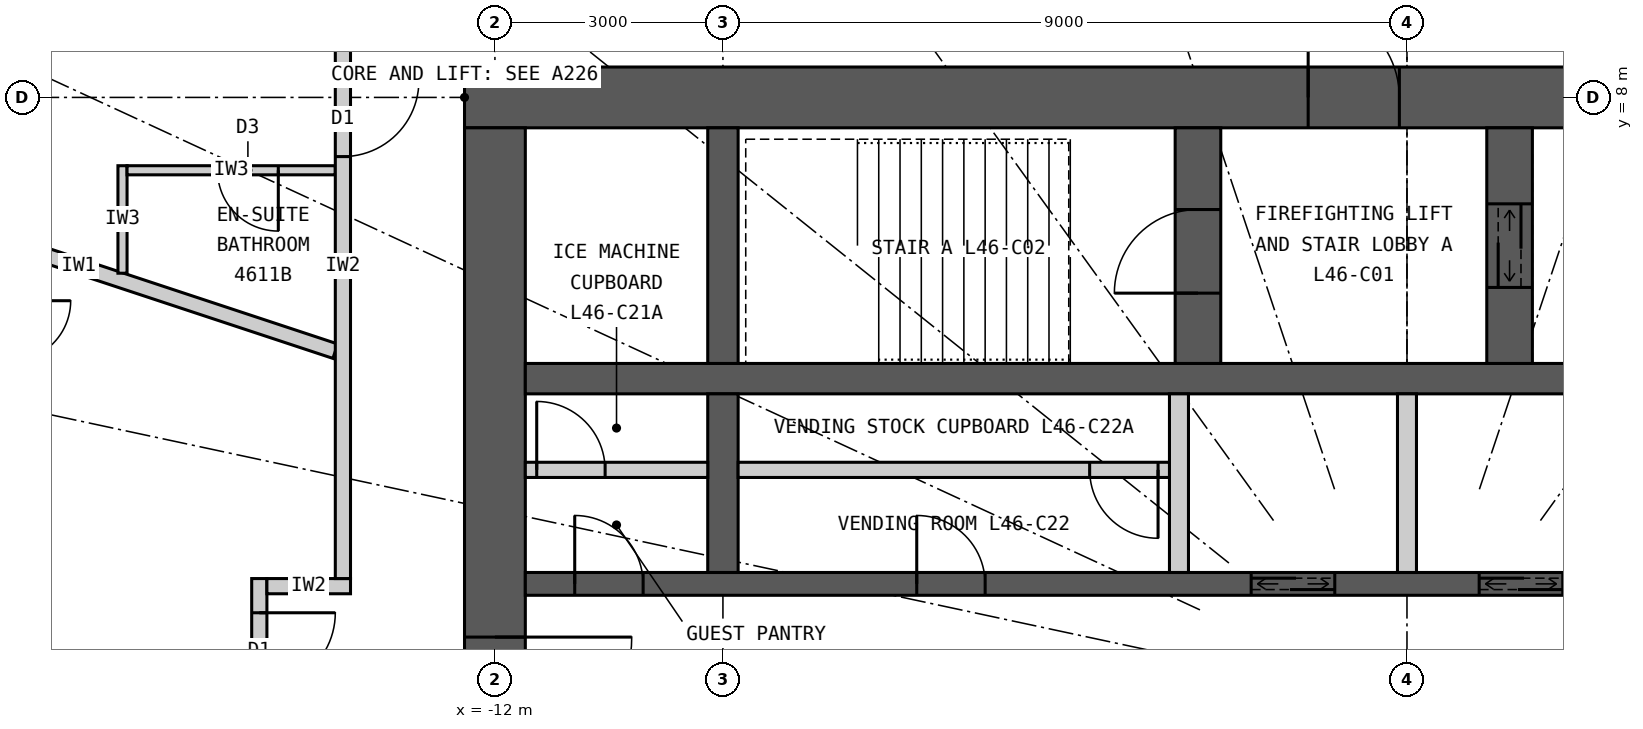
"""IFC4 building model, lengths in metres.
Left out: names, types, materials, properties, quantities, classifications, styles, units other than length and angle.
Written with IfcOpenShell. Run it as: python <this file> out.ifc"""

import sys

from ifc_helpers import new_model, si_unit, direction, frame, frame_2d, origin, place, context, subcontext, project, spatial, rectangle, extrude, element, fill, save


model = new_model("IFC4")
c1 = context("Model", 3, precision=1e-05, world=origin(), true_north=direction((0.0, 1.0)))
c2 = subcontext(c1, "Body", "Model", "MODEL_VIEW")
j1 = project(units=[si_unit("LENGTHUNIT", "METRE"), si_unit("PLANEANGLEUNIT", "RADIAN")], contexts=[c1])
p1 = place(None, origin())
s1 = spatial("IfcSite", under=j1, at=p1, CompositionType="ELEMENT")
p2 = place(p1, origin())
s2 = spatial("IfcBuilding", under=s1, at=p2, CompositionType="ELEMENT")
p3 = place(p2, frame((0.0, 0.0, 173.1)))
s3 = spatial("IfcBuildingStorey", under=s2, at=p3, CompositionType="ELEMENT", Elevation=173.1)
p4 = place(p3, frame((-12.4, 8.0, 0.0), z_axis=(0.0, 0.0, 1.0), x_axis=(1.0, 0.0, 0.0)))
e1 = element("IfcWall", 1, at=p4, inside=s3, PredefinedType="SHEAR", context=c2, shape_type="SweptSolid", body=[
    extrude(rectangle(XDim=24.8, YDim=0.8, at=frame_2d((12.4, 0.0))), origin(), (0.0, 0.0, 1.0), 3.3),
])
p5 = place(p4, frame((11.1, 0.0, 0.0)))
e2 = element("IfcOpeningElement", 2, at=p5, cuts=e1, PredefinedType="OPENING", context=c2, shape_type="SweptSolid", body=[
    extrude(rectangle(XDim=1.2, YDim=2.2, at=frame_2d((0.6, 1.1))), frame((0.0, 0.41, 0.0), z_axis=(0.0, -1.0, 0.0), x_axis=(1.0, 0.0, 0.0)), (0.0, 0.0, 1.0), 0.82),
])
p6 = place(p4, frame((18.7, 0.0, 0.0)))
e3 = element("IfcOpeningElement", 3, at=p6, cuts=e1, PredefinedType="OPENING", context=c2, shape_type="SweptSolid", body=[
    extrude(rectangle(XDim=0.9, YDim=2.2, at=frame_2d((0.45, 1.1))), frame((0.0, 0.41, 0.0), z_axis=(0.0, -1.0, 0.0), x_axis=(1.0, 0.0, 0.0)), (0.0, 0.0, 1.0), 0.82),
])
p7 = place(p3, frame((-12.0, 7.6, 0.0), z_axis=(0.0, 0.0, 1.0), x_axis=(0.0, -1.0, 0.0)))
e4 = element("IfcWall", 4, at=p7, inside=s3, PredefinedType="SHEAR", context=c2, shape_type="SweptSolid", body=[
    extrude(rectangle(XDim=15.2, YDim=0.8, at=frame_2d((7.6, 0.0))), origin(), (0.0, 0.0, 1.0), 3.3),
])
p8 = place(p7, frame((6.7, 0.0, 0.0)))
e5 = element("IfcOpeningElement", 5, at=p8, cuts=e4, PredefinedType="OPENING", context=c2, shape_type="SweptSolid", body=[
    extrude(rectangle(XDim=1.8, YDim=2.2, at=frame_2d((0.9, 1.1))), frame((0.0, 0.41, 0.0), z_axis=(0.0, -1.0, 0.0), x_axis=(1.0, 0.0, 0.0)), (0.0, 0.0, 1.0), 0.82),
])
p9 = place(p3, frame((-11.6, 4.3, 0.0), z_axis=(0.0, 0.0, 1.0), x_axis=(1.0, 0.0, 0.0)))
e6 = element("IfcWall", 6, at=p9, inside=s3, PredefinedType="SHEAR", context=c2, shape_type="SweptSolid", body=[
    extrude(rectangle(XDim=23.2, YDim=0.4, at=frame_2d((11.6, 0.0))), origin(), (0.0, 0.0, 1.0), 3.3),
])
p10 = place(p3, frame((-11.6, 1.6, 0.0), z_axis=(0.0, 0.0, 1.0), x_axis=(1.0, 0.0, 0.0)))
e7 = element("IfcWall", 7, at=p10, inside=s3, PredefinedType="SHEAR", context=c2, shape_type="SweptSolid", body=[
    extrude(rectangle(XDim=23.2, YDim=0.3, at=frame_2d((11.6, 0.0))), origin(), (0.0, 0.0, 1.0), 3.3),
])
p11 = place(p10, frame((9.55, 0.0, 0.0)))
e8 = element("IfcOpeningElement", 8, at=p11, cuts=e7, PredefinedType="OPENING", context=c2, shape_type="SweptSolid", body=[
    extrude(rectangle(XDim=1.1, YDim=2.2, at=frame_2d((0.55, 1.1))), frame((0.0, 0.16, 0.0), z_axis=(0.0, -1.0, 0.0), x_axis=(1.0, 0.0, 0.0)), (0.0, 0.0, 1.0), 0.32),
])
p12 = place(p10, frame((12.55, 0.0, 0.0)))
e9 = element("IfcOpeningElement", 9, at=p12, cuts=e7, PredefinedType="OPENING", context=c2, shape_type="SweptSolid", body=[
    extrude(rectangle(XDim=1.1, YDim=2.2, at=frame_2d((0.55, 1.1))), frame((0.0, 0.16, 0.0), z_axis=(0.0, -1.0, 0.0), x_axis=(1.0, 0.0, 0.0)), (0.0, 0.0, 1.0), 0.32),
])
p13 = place(p10, frame((0.65, 0.0, 0.0)))
e10 = element("IfcOpeningElement", 10, at=p13, cuts=e7, PredefinedType="OPENING", context=c2, shape_type="SweptSolid", body=[
    extrude(rectangle(XDim=0.9, YDim=2.2, at=frame_2d((0.45, 1.1))), frame((0.0, 0.16, 0.0), z_axis=(0.0, -1.0, 0.0), x_axis=(1.0, 0.0, 0.0)), (0.0, 0.0, 1.0), 0.32),
])
p14 = place(p10, frame((5.15, 0.0, 0.0)))
e11 = element("IfcOpeningElement", 11, at=p14, cuts=e7, PredefinedType="OPENING", context=c2, shape_type="SweptSolid", body=[
    extrude(rectangle(XDim=0.9, YDim=2.2, at=frame_2d((0.45, 1.1))), frame((0.0, 0.16, 0.0), z_axis=(0.0, -1.0, 0.0), x_axis=(1.0, 0.0, 0.0)), (0.0, 0.0, 1.0), 0.32),
])
p15 = place(p10, frame((21.65, 0.0, 0.0)))
e12 = element("IfcOpeningElement", 12, at=p15, cuts=e7, PredefinedType="OPENING", context=c2, shape_type="SweptSolid", body=[
    extrude(rectangle(XDim=0.9, YDim=2.2, at=frame_2d((0.45, 1.1))), frame((0.0, 0.16, 0.0), z_axis=(0.0, -1.0, 0.0), x_axis=(1.0, 0.0, 0.0)), (0.0, 0.0, 1.0), 0.32),
])
p16 = place(p3, frame((-9.0, 4.5, 0.0), z_axis=(0.0, 0.0, 1.0), x_axis=(0.0, 1.0, 0.0)))
e13 = element("IfcWall", 13, at=p16, inside=s3, PredefinedType="SHEAR", context=c2, shape_type="SweptSolid", body=[
    extrude(rectangle(XDim=3.1, YDim=0.4, at=frame_2d((1.55, 0.0))), origin(), (0.0, 0.0, 1.0), 3.3),
])
p17 = place(p3, frame((-9.0, 1.75, 0.0), z_axis=(0.0, 0.0, 1.0), x_axis=(0.0, 1.0, 0.0)))
e14 = element("IfcWall", 14, at=p17, inside=s3, PredefinedType="SHEAR", context=c2, shape_type="SweptSolid", body=[
    extrude(rectangle(XDim=2.35, YDim=0.4, at=frame_2d((1.175, 0.0))), origin(), (0.0, 0.0, 1.0), 3.3),
])
p18 = place(p3, frame((-2.75, 4.5, 0.0), z_axis=(0.0, 0.0, 1.0), x_axis=(0.0, 1.0, 0.0)))
e15 = element("IfcWall", 15, at=p18, inside=s3, PredefinedType="SHEAR", context=c2, shape_type="SweptSolid", body=[
    extrude(rectangle(XDim=3.1, YDim=0.6, at=frame_2d((1.55, 0.0))), origin(), (0.0, 0.0, 1.0), 3.3),
])
p19 = place(p18, frame((0.925, 0.0, 0.0)))
e16 = element("IfcOpeningElement", 16, at=p19, cuts=e15, PredefinedType="OPENING", context=c2, shape_type="SweptSolid", body=[
    extrude(rectangle(XDim=1.1, YDim=2.2, at=frame_2d((0.55, 1.1))), frame((0.0, 0.31, 0.0), z_axis=(0.0, -1.0, 0.0), x_axis=(1.0, 0.0, 0.0)), (0.0, 0.0, 1.0), 0.62),
])
p20 = place(p3, frame((1.35, 4.5, 0.0), z_axis=(0.0, 0.0, 1.0), x_axis=(0.0, 1.0, 0.0)))
e17 = element("IfcWall", 17, at=p20, inside=s3, PredefinedType="SHEAR", context=c2, shape_type="SweptSolid", body=[
    extrude(rectangle(XDim=3.1, YDim=0.6, at=frame_2d((1.55, 0.0))), origin(), (0.0, 0.0, 1.0), 3.3),
])
p21 = place(p20, frame((1.0, 0.0, 0.0)))
e18 = element("IfcOpeningElement", 18, at=p21, cuts=e17, PredefinedType="OPENING", context=c2, shape_type="SweptSolid", body=[
    extrude(rectangle(XDim=1.1, YDim=2.2, at=frame_2d((0.55, 1.1))), frame((0.0, 0.31, 0.0), z_axis=(0.0, -1.0, 0.0), x_axis=(1.0, 0.0, 0.0)), (0.0, 0.0, 1.0), 0.62),
])
for number, where, z_axis, x_axis in (
    (19, (-3.0, 1.75, 0.0), (0.0, 0.0, 1.0), (0.0, 1.0, 0.0)),
    (20, (0.0, 1.75, 0.0), (0.0, 0.0, 1.0), (0.0, 1.0, 0.0)),
):
    element("IfcWall", number, at=place(p3, frame(where, z_axis=z_axis, x_axis=x_axis)), inside=s3, PredefinedType="PARTITIONING", context=c2, shape_type="SweptSolid", body=[
        extrude(rectangle(XDim=2.35, YDim=0.25, at=frame_2d((1.175, 0.0))), origin(), (0.0, 0.0, 1.0), 3.3),
    ])
p22 = place(p3, frame((-14.1, 4.661, 0.0), z_axis=(0.0, 0.0, 1.0), x_axis=(-0.949453216399, 0.313908569285, 0.0)))
e21 = element("IfcWall", 21, at=p22, inside=s3, PredefinedType="PARTITIONING", context=c2, shape_type="SweptSolid", body=[
    extrude(rectangle(XDim=7.109, YDim=0.2, at=frame_2d((3.554, 0.0))), origin(), (0.0, 0.0, 1.0), 3.12),
])
p23 = place(p3, frame((-15.1, 1.67, 0.0), z_axis=(0.0, 0.0, 1.0), x_axis=(0.0, -1.0, 0.0)))
e22 = element("IfcWall", 22, at=p23, inside=s3, PredefinedType="PARTITIONING", context=c2, shape_type="SweptSolid", body=[
    extrude(rectangle(XDim=3.34, YDim=0.2, at=frame_2d((1.67, 0.0))), origin(), (0.0, 0.0, 1.0), 3.12),
])
p24 = place(p23, frame((0.45, 0.0, 0.0)))
e23 = element("IfcOpeningElement", 23, at=p24, cuts=e22, PredefinedType="OPENING", context=c2, shape_type="SweptSolid", body=[
    extrude(rectangle(XDim=1.0, YDim=2.2, at=frame_2d((0.5, 1.1))), frame((0.0, 0.11, 0.0), z_axis=(0.0, -1.0, 0.0), x_axis=(1.0, 0.0, 0.0)), (0.0, 0.0, 1.0), 0.22),
])
p25 = place(p23, frame((1.89, 0.0, 0.0)))
e24 = element("IfcOpeningElement", 24, at=p25, cuts=e22, PredefinedType="OPENING", context=c2, shape_type="SweptSolid", body=[
    extrude(rectangle(XDim=1.0, YDim=2.2, at=frame_2d((0.5, 1.1))), frame((0.0, 0.11, 0.0), z_axis=(0.0, -1.0, 0.0), x_axis=(1.0, 0.0, 0.0)), (0.0, 0.0, 1.0), 0.22),
])
p26 = place(p3, frame((-13.9, 1.57, 0.0), z_axis=(0.0, 0.0, 1.0), x_axis=(-1.0, 0.0, 0.0)))
e25 = element("IfcWall", 25, at=p26, inside=s3, PredefinedType="PARTITIONING", context=c2, shape_type="SweptSolid", body=[
    extrude(rectangle(XDim=1.1, YDim=0.2, at=frame_2d((0.55, 0.0))), origin(), (0.0, 0.0, 1.0), 2.47),
])
p27 = place(p3, frame((-16.9, 5.687, 0.0), z_axis=(0.0, 0.0, 1.0), x_axis=(0.0, 1.0, 0.0)))
e26 = element("IfcWall", 26, at=p27, inside=s3, PredefinedType="PARTITIONING", context=c2, shape_type="SweptSolid", body=[
    extrude(rectangle(XDim=1.414, YDim=0.12, at=frame_2d((0.707, 0.0))), origin(), (0.0, 0.0, 1.0), 3.12),
])
p28 = place(p3, frame((-14.1, 7.042, 0.0), z_axis=(0.0, 0.0, 1.0), x_axis=(-1.0, 0.0, 0.0)))
e27 = element("IfcWall", 27, at=p28, inside=s3, PredefinedType="PARTITIONING", context=c2, shape_type="SweptSolid", body=[
    extrude(rectangle(XDim=2.74, YDim=0.12, at=frame_2d((1.37, 0.0))), origin(), (0.0, 0.0, 1.0), 3.12),
])
p29 = place(p28, frame((0.75, 0.0, 0.0)))
e28 = element("IfcOpeningElement", 28, at=p29, cuts=e27, PredefinedType="OPENING", context=c2, shape_type="SweptSolid", body=[
    extrude(rectangle(XDim=0.8, YDim=2.1, at=frame_2d((0.4, 1.05))), frame((0.0, 0.07, 0.0), z_axis=(0.0, -1.0, 0.0), x_axis=(1.0, 0.0, 0.0)), (0.0, 0.0, 1.0), 0.14),
])
p30 = place(p3, frame((-14.0, 9.9, 0.0), z_axis=(0.0, 0.0, 1.0), x_axis=(0.0, -1.0, 0.0)))
e29 = element("IfcWall", 29, at=p30, inside=s3, PredefinedType="PARTITIONING", context=c2, shape_type="SweptSolid", body=[
    extrude(rectangle(XDim=8.23, YDim=0.2, at=frame_2d((4.115, 0.0))), origin(), (0.0, 0.0, 1.0), 3.12),
])
p31 = place(p30, frame((1.678, 0.0, 0.0)))
e30 = element("IfcOpeningElement", 30, at=p31, cuts=e29, PredefinedType="OPENING", context=c2, shape_type="SweptSolid", body=[
    extrude(rectangle(XDim=1.0, YDim=2.2, at=frame_2d((0.5, 1.1))), frame((0.0, 0.11, 0.0), z_axis=(0.0, -1.0, 0.0), x_axis=(1.0, 0.0, 0.0)), (0.0, 0.0, 1.0), 0.22),
])
p32 = place(p3, frame((-11.6, 3.1, 0.0), z_axis=(0.0, 0.0, 1.0), x_axis=(1.0, 0.0, 0.0)))
e31 = element("IfcWall", 31, at=p32, inside=s3, PredefinedType="PARTITIONING", context=c2, shape_type="SweptSolid", body=[
    extrude(rectangle(XDim=2.4, YDim=0.2, at=frame_2d((1.2, 0.0))), origin(), (0.0, 0.0, 1.0), 3.12),
])
p33 = place(p32, frame((0.15, 0.0, 0.0)))
e32 = element("IfcOpeningElement", 32, at=p33, cuts=e31, PredefinedType="OPENING", context=c2, shape_type="SweptSolid", body=[
    extrude(rectangle(XDim=0.9, YDim=2.2, at=frame_2d((0.45, 1.1))), frame((0.0, 0.11, 0.0), z_axis=(0.0, -1.0, 0.0), x_axis=(1.0, 0.0, 0.0)), (0.0, 0.0, 1.0), 0.22),
])
p34 = place(p3, frame((-8.8, 3.1, 0.0), z_axis=(0.0, 0.0, 1.0), x_axis=(1.0, 0.0, 0.0)))
e33 = element("IfcWall", 33, at=p34, inside=s3, PredefinedType="PARTITIONING", context=c2, shape_type="SweptSolid", body=[
    extrude(rectangle(XDim=5.675, YDim=0.2, at=frame_2d((2.837, 0.0))), origin(), (0.0, 0.0, 1.0), 3.12),
])
p35 = place(p34, frame((4.625, 0.0, 0.0)))
e34 = element("IfcOpeningElement", 34, at=p35, cuts=e33, PredefinedType="OPENING", context=c2, shape_type="SweptSolid", body=[
    extrude(rectangle(XDim=0.9, YDim=2.2, at=frame_2d((0.45, 1.1))), frame((0.0, 0.11, 0.0), z_axis=(0.0, -1.0, 0.0), x_axis=(1.0, 0.0, 0.0)), (0.0, 0.0, 1.0), 0.22),
])
p36 = place(p29, origin())
e35 = element("IfcDoor", 35, at=p36, inside=s3, OperationType="SINGLE_SWING_LEFT", PredefinedType="DOOR", context=c2, shape_type="SweptSolid", body=[
    extrude(rectangle(XDim=0.8, YDim=2.1, at=frame_2d((0.4, 1.05))), frame((0.0, 0.025, 0.0), z_axis=(0.0, -1.0, 0.0), x_axis=(1.0, 0.0, 0.0)), (0.0, 0.0, 1.0), 0.05),
])
fill(e28, e35)
p37 = place(p31, origin())
e36 = element("IfcDoor", 36, at=p37, inside=s3, OperationType="SINGLE_SWING_LEFT", PredefinedType="DOOR", context=c2, shape_type="SweptSolid", body=[
    extrude(rectangle(XDim=1.0, YDim=2.2, at=frame_2d((0.5, 1.1))), frame((0.0, 0.025, 0.0), z_axis=(0.0, -1.0, 0.0), x_axis=(1.0, 0.0, 0.0)), (0.0, 0.0, 1.0), 0.05),
])
fill(e30, e36)
p38 = place(p24, origin())
e37 = element("IfcDoor", 37, at=p38, inside=s3, OperationType="SINGLE_SWING_LEFT", PredefinedType="DOOR", context=c2, shape_type="SweptSolid", body=[
    extrude(rectangle(XDim=1.0, YDim=2.2, at=frame_2d((0.5, 1.1))), frame((0.0, 0.025, 0.0), z_axis=(0.0, -1.0, 0.0), x_axis=(1.0, 0.0, 0.0)), (0.0, 0.0, 1.0), 0.05),
])
fill(e23, e37)
p39 = place(p5, origin())
e38 = element("IfcDoor", 38, at=p39, inside=s3, OperationType="SINGLE_SWING_LEFT", PredefinedType="DOOR", context=c2, shape_type="SweptSolid", body=[
    extrude(rectangle(XDim=1.2, YDim=2.2, at=frame_2d((0.6, 1.1))), frame((0.0, 0.025, 0.0), z_axis=(0.0, -1.0, 0.0), x_axis=(1.0, 0.0, 0.0)), (0.0, 0.0, 1.0), 0.05),
])
fill(e2, e38)
p40 = place(p19, origin())
e39 = element("IfcDoor", 39, at=p40, inside=s3, OperationType="SINGLE_SWING_LEFT", PredefinedType="DOOR", context=c2, shape_type="SweptSolid", body=[
    extrude(rectangle(XDim=1.1, YDim=2.2, at=frame_2d((0.55, 1.1))), frame((0.0, 0.025, 0.0), z_axis=(0.0, -1.0, 0.0), x_axis=(1.0, 0.0, 0.0)), (0.0, 0.0, 1.0), 0.05),
])
fill(e16, e39)
p41 = place(p21, origin())
e40 = element("IfcDoor", 40, at=p41, inside=s3, OperationType="DOUBLE_DOOR_SLIDING", PredefinedType="DOOR", context=c2, shape_type="SweptSolid", body=[
    extrude(rectangle(XDim=1.1, YDim=2.2, at=frame_2d((0.55, 1.1))), frame((0.0, 0.025, 0.0), z_axis=(0.0, -1.0, 0.0), x_axis=(1.0, 0.0, 0.0)), (0.0, 0.0, 1.0), 0.05),
])
fill(e18, e40)
p42 = place(p11, origin())
e41 = element("IfcDoor", 41, at=p42, inside=s3, OperationType="DOUBLE_DOOR_SLIDING", PredefinedType="DOOR", context=c2, shape_type="SweptSolid", body=[
    extrude(rectangle(XDim=1.1, YDim=2.2, at=frame_2d((0.55, 1.1))), frame((0.0, 0.025, 0.0), z_axis=(0.0, -1.0, 0.0), x_axis=(1.0, 0.0, 0.0)), (0.0, 0.0, 1.0), 0.05),
])
fill(e8, e41)
p43 = place(p12, origin())
e42 = element("IfcDoor", 42, at=p43, inside=s3, OperationType="DOUBLE_DOOR_SLIDING", PredefinedType="DOOR", context=c2, shape_type="SweptSolid", body=[
    extrude(rectangle(XDim=1.1, YDim=2.2, at=frame_2d((0.55, 1.1))), frame((0.0, 0.025, 0.0), z_axis=(0.0, -1.0, 0.0), x_axis=(1.0, 0.0, 0.0)), (0.0, 0.0, 1.0), 0.05),
])
fill(e9, e42)
p44 = place(p33, origin())
e43 = element("IfcDoor", 43, at=p44, inside=s3, OperationType="SINGLE_SWING_LEFT", PredefinedType="DOOR", context=c2, shape_type="SweptSolid", body=[
    extrude(rectangle(XDim=0.9, YDim=2.2, at=frame_2d((0.45, 1.1))), frame((0.0, 0.025, 0.0), z_axis=(0.0, -1.0, 0.0), x_axis=(1.0, 0.0, 0.0)), (0.0, 0.0, 1.0), 0.05),
])
fill(e32, e43)
p45 = place(p13, origin())
e44 = element("IfcDoor", 44, at=p45, inside=s3, OperationType="SINGLE_SWING_LEFT", PredefinedType="DOOR", context=c2, shape_type="SweptSolid", body=[
    extrude(rectangle(XDim=0.9, YDim=2.2, at=frame_2d((0.45, 1.1))), frame((0.0, 0.025, 0.0), z_axis=(0.0, -1.0, 0.0), x_axis=(1.0, 0.0, 0.0)), (0.0, 0.0, 1.0), 0.05),
])
fill(e10, e44)
p46 = place(p35, origin())
e45 = element("IfcDoor", 45, at=p46, inside=s3, OperationType="SINGLE_SWING_RIGHT", PredefinedType="DOOR", context=c2, shape_type="SweptSolid", body=[
    extrude(rectangle(XDim=0.9, YDim=2.2, at=frame_2d((0.45, 1.1))), frame((0.0, 0.025, 0.0), z_axis=(0.0, -1.0, 0.0), x_axis=(1.0, 0.0, 0.0)), (0.0, 0.0, 1.0), 0.05),
])
fill(e34, e45)
p47 = place(p14, origin())
e46 = element("IfcDoor", 46, at=p47, inside=s3, OperationType="SINGLE_SWING_LEFT", PredefinedType="DOOR", context=c2, shape_type="SweptSolid", body=[
    extrude(rectangle(XDim=0.9, YDim=2.2, at=frame_2d((0.45, 1.1))), frame((0.0, 0.025, 0.0), z_axis=(0.0, -1.0, 0.0), x_axis=(1.0, 0.0, 0.0)), (0.0, 0.0, 1.0), 0.05),
])
fill(e11, e46)
p48 = place(p8, origin())
e47 = element("IfcDoor", 47, at=p48, inside=s3, OperationType="DOUBLE_DOOR_DOUBLE_SWING", PredefinedType="DOOR", context=c2, shape_type="SweptSolid", body=[
    extrude(rectangle(XDim=1.8, YDim=2.2, at=frame_2d((0.9, 1.1))), frame((0.0, 0.025, 0.0), z_axis=(0.0, -1.0, 0.0), x_axis=(1.0, 0.0, 0.0)), (0.0, 0.0, 1.0), 0.05),
])
fill(e5, e47)
save(model, sys.argv[1])
